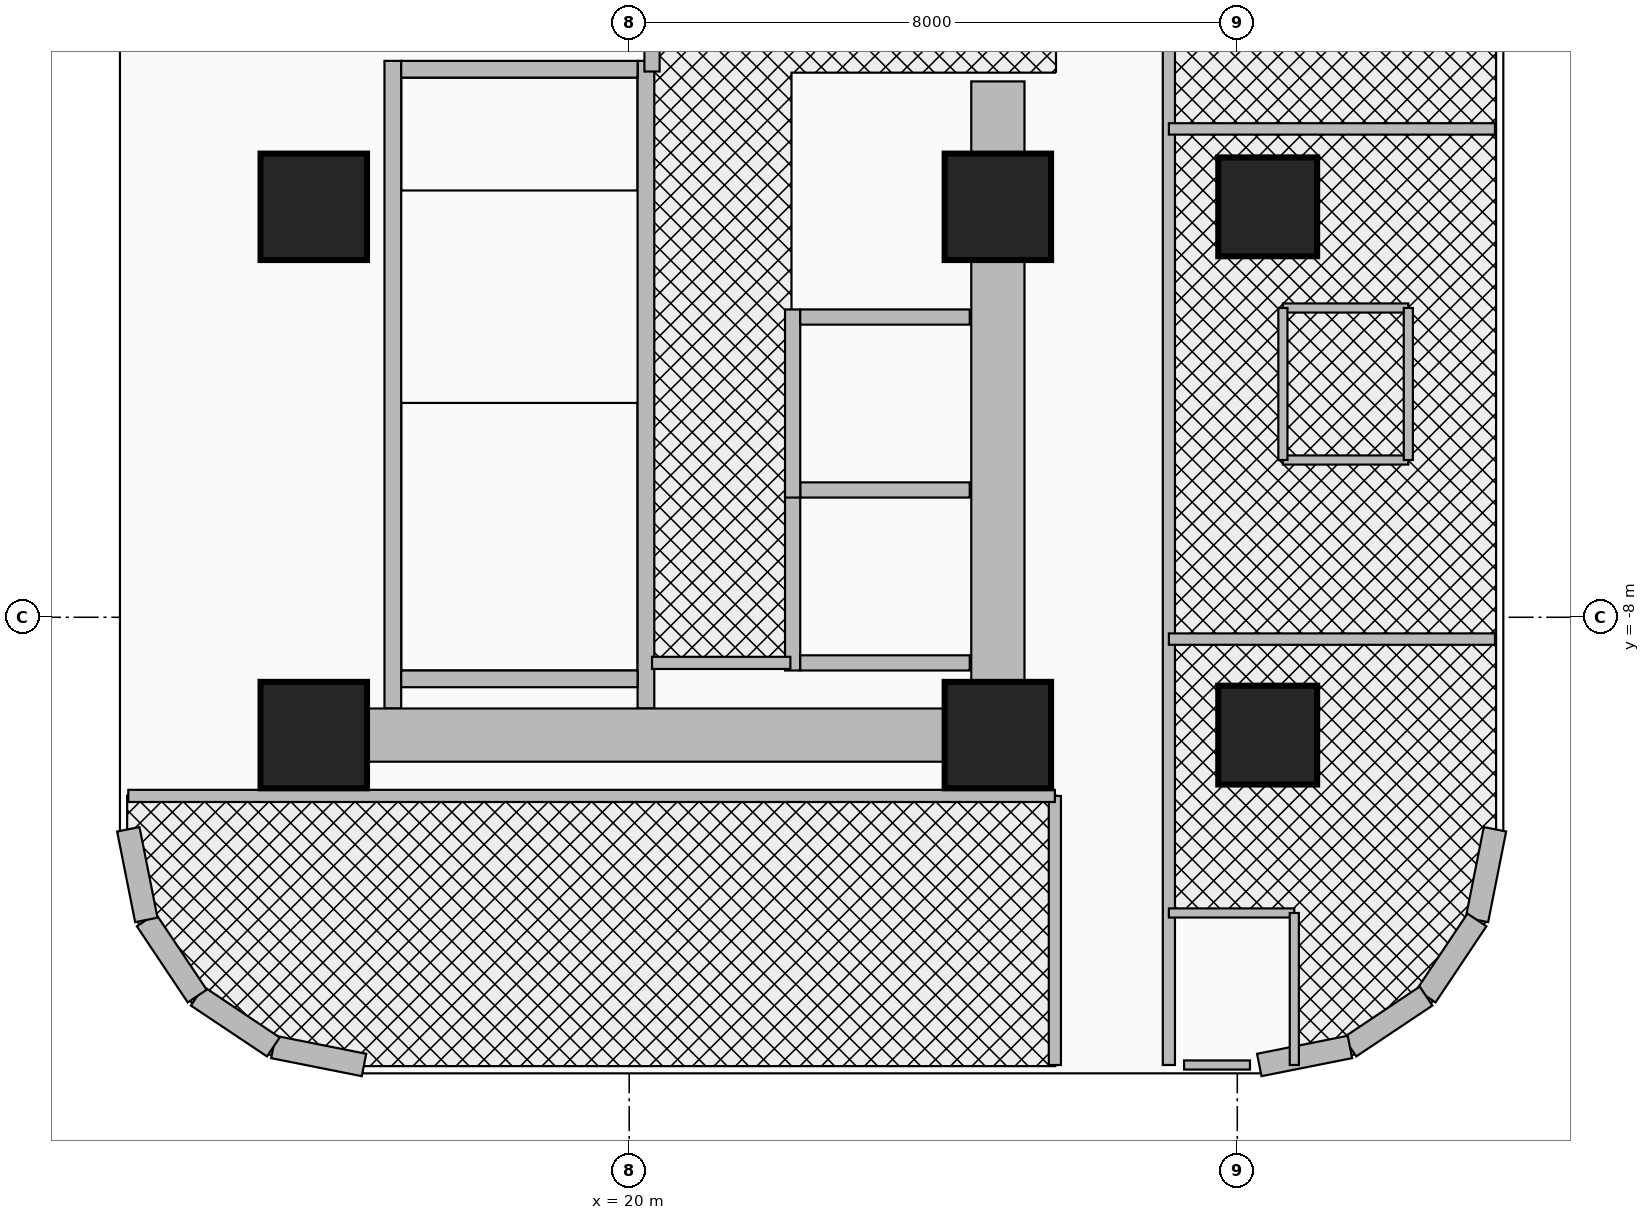
"""IFC4 building model, lengths in metres.
Left out: names, types, materials, properties, quantities, classifications, styles, units other than length and angle.
Written with IfcOpenShell. Run it as: python <this file> out.ifc"""

import sys

from ifc_helpers import new_model, si_unit, direction, frame, frame_2d, origin, origin_2d, place, context, subcontext, project, spatial, rectangle, circle, extrude, source, transform, mapped, element, fill, save


model = new_model("IFC4")
c1 = context("Model", 3, precision=1e-05, world=origin(), true_north=direction((0.0, 1.0)))
c2 = subcontext(c1, "Body", "Model", "MODEL_VIEW")
j1 = project(units=[si_unit("LENGTHUNIT", "METRE"), si_unit("PLANEANGLEUNIT", "RADIAN")], contexts=[c1])
p1 = place(None, origin())
s1 = spatial("IfcSite", under=j1, at=p1, CompositionType="ELEMENT")
p2 = place(p1, origin())
s2 = spatial("IfcBuilding", under=s1, at=p2, CompositionType="ELEMENT")
p3 = place(p2, frame((0.0, 0.0, 70.4)))
s3 = spatial("IfcBuildingStorey", under=s2, at=p3, CompositionType="ELEMENT", Elevation=70.4)
for number, where, z_axis, x_axis in (
    (1, (16.89, -9.2, 0.0), (0.0, 0.0, 1.0), (0.0, 1.0, 0.0)),
    (2, (20.22, -9.2, 0.0), (0.0, 0.0, 1.0), (0.0, 1.0, 0.0)),
):
    element("IfcWall", number, at=place(p3, frame(where, z_axis=z_axis, x_axis=x_axis)), inside=s3, PredefinedType="SHEAR", context=c2, shape_type="SweptSolid", body=[
        extrude(rectangle(XDim=8.52, YDim=0.22, at=frame_2d((4.26, 0.0))), origin(), (0.0, 0.0, 1.0), 3.46),
    ])
p4 = place(p3, frame((17.0, -8.81, 0.0), z_axis=(0.0, 0.0, 1.0), x_axis=(1.0, 0.0, 0.0)))
e3 = element("IfcWall", 3, at=p4, inside=s3, PredefinedType="SHEAR", context=c2, shape_type="SweptSolid", body=[
    extrude(rectangle(XDim=3.11, YDim=0.22, at=frame_2d((1.555, 0.0))), origin(), (0.0, 0.0, 1.0), 3.46),
])
p5 = place(p3, frame((17.0, -0.79, 0.0), z_axis=(0.0, 0.0, 1.0), x_axis=(1.0, 0.0, 0.0)))
e4 = element("IfcWall", 4, at=p5, inside=s3, PredefinedType="SHEAR", context=c2, shape_type="SweptSolid", body=[
    extrude(rectangle(XDim=3.11, YDim=0.22, at=frame_2d((1.555, 0.0))), origin(), (0.0, 0.0, 1.0), 3.46),
])
p6 = place(p5, frame((0.95, 0.0, 0.0)))
e5 = element("IfcOpeningElement", 5, at=p6, cuts=e4, PredefinedType="OPENING", context=c2, shape_type="SweptSolid", body=[
    extrude(rectangle(XDim=1.1, YDim=2.15, at=frame_2d((0.55, 1.075))), frame((0.0, 0.125, 0.0), z_axis=(0.0, -1.0, 0.0), x_axis=(1.0, 0.0, 0.0)), (0.0, 0.0, 1.0), 0.25),
])
p7 = place(p3, frame((24.85, -9.9, 0.0), z_axis=(0.0, 0.0, 1.0), x_axis=(0.0, 1.0, 0.0)))
e6 = element("IfcWall", 6, at=p7, inside=s3, PredefinedType="SHEAR", context=c2, shape_type="SweptSolid", body=[
    extrude(rectangle(XDim=8.95, YDim=0.7, at=frame_2d((4.475, 0.0))), origin(), (0.0, 0.0, 1.0), 3.46),
])
p8 = place(p3, frame((15.85, -9.55, 0.0), z_axis=(0.0, 0.0, 1.0), x_axis=(1.0, 0.0, 0.0)))
e7 = element("IfcWall", 7, at=p8, inside=s3, PredefinedType="SHEAR", context=c2, shape_type="SweptSolid", body=[
    extrude(rectangle(XDim=9.0, YDim=0.7, at=frame_2d((4.5, 0.0))), origin(), (0.0, 0.0, 1.0), 3.46),
])
m1 = source(origin(), c2, "Body", "SweptSolid", [
    extrude(rectangle(XDim=1.4, YDim=1.4, at=origin_2d()), origin(), (0.0, 0.0, 1.0), 3.7),
])
for number, where, z_axis, x_axis in (
    (8, (15.85, -9.55, 0.0), (0.0, 0.0, 1.0), (1.0, 0.0, 0.0)),
    (9, (24.85, -9.55, 0.0), (0.0, 0.0, 1.0), (1.0, 0.0, 0.0)),
):
    element("IfcColumn", number, at=place(p3, frame(where, z_axis=z_axis, x_axis=x_axis)), inside=s3, PredefinedType="COLUMN", context=c2, shape_type="MappedRepresentation", body=[
        mapped(m1, transform((0.0, 0.0, 0.0), x_axis=(1.0, 0.0, 0.0), y_axis=(0.0, 1.0, 0.0), z_axis=(0.0, 0.0, 1.0), scale=1.0)),
    ])
m2 = source(origin(), c2, "Body", "SweptSolid", [
    extrude(circle(Radius=0.65, at=origin_2d()), origin(), (0.0, 0.0, 1.0), 3.7),
])
p9 = place(p3, frame((28.4, -9.55, 0.0), z_axis=(0.0, 0.0, 1.0), x_axis=(1.0, 0.0, 0.0)))
e10 = element("IfcColumn", 10, at=p9, inside=s3, PredefinedType="COLUMN", context=c2, shape_type="MappedRepresentation", body=[
    mapped(m2, transform((0.0, 0.0, 0.0), x_axis=(1.0, 0.0, 0.0), y_axis=(0.0, 1.0, 0.0), z_axis=(0.0, 0.0, 1.0), scale=1.0)),
])
for number, where, z_axis, x_axis in (
    (11, (15.85, -2.6, 0.0), (0.0, 0.0, 1.0), (1.0, 0.0, 0.0)),
    (12, (24.85, -2.6, 0.0), (0.0, 0.0, 1.0), (1.0, 0.0, 0.0)),
):
    element("IfcColumn", number, at=place(p3, frame(where, z_axis=z_axis, x_axis=x_axis)), inside=s3, PredefinedType="COLUMN", context=c2, shape_type="MappedRepresentation", body=[
        mapped(m1, transform((0.0, 0.0, 0.0), x_axis=(1.0, 0.0, 0.0), y_axis=(0.0, 1.0, 0.0), z_axis=(0.0, 0.0, 1.0), scale=1.0)),
    ])
p10 = place(p3, frame((28.4, -2.6, 0.0), z_axis=(0.0, 0.0, 1.0), x_axis=(1.0, 0.0, 0.0)))
e13 = element("IfcColumn", 13, at=p10, inside=s3, PredefinedType="COLUMN", context=c2, shape_type="MappedRepresentation", body=[
    mapped(m2, transform((0.0, 0.0, 0.0), x_axis=(1.0, 0.0, 0.0), y_axis=(0.0, 1.0, 0.0), z_axis=(0.0, 0.0, 1.0), scale=1.0)),
])
p11 = place(p3, frame((31.39, -10.789, 0.0), z_axis=(0.0, 0.0, 1.0), x_axis=(-0.194996050505, -0.980804027463, 0.0)))
e14 = element("IfcWall", 14, at=p11, inside=s3, PredefinedType="SOLIDWALL", context=c2, shape_type="SweptSolid", body=[
    extrude(rectangle(XDim=1.216, YDim=0.3, at=frame_2d((0.608, 0.0))), origin(), (0.0, 0.0, 1.0), 3.46),
])
for number, where, z_axis, x_axis in (
    (15, (31.153, -11.982, 0.0), (0.0, 0.0, 1.0), (-0.556, -0.831, 0.0)),
    (16, (30.483, -12.983, 0.0), (0.0, 0.0, 1.0), (-0.831, -0.556, 0.0)),
):
    element("IfcWall", number, at=place(p3, frame(where, z_axis=z_axis, x_axis=x_axis)), inside=s3, PredefinedType="SOLIDWALL", context=c2, shape_type="SweptSolid", body=[
        extrude(rectangle(XDim=1.205, YDim=0.3, at=frame_2d((0.603, 0.0))), origin(), (0.0, 0.0, 1.0), 3.46),
    ])
for number, where, z_axis, x_axis in (
    (17, (29.482, -13.653, 0.0), (0.0, 0.0, 1.0), (-0.981, -0.195, 0.0)),
    (18, (16.511, -13.89, 0.0), (0.0, 0.0, 1.0), (-0.981, 0.195, 0.0)),
):
    element("IfcWall", number, at=place(p3, frame(where, z_axis=z_axis, x_axis=x_axis)), inside=s3, PredefinedType="SOLIDWALL", context=c2, shape_type="SweptSolid", body=[
        extrude(rectangle(XDim=1.216, YDim=0.3, at=frame_2d((0.608, 0.0))), origin(), (0.0, 0.0, 1.0), 3.46),
    ])
for number, where, z_axis, x_axis in (
    (19, (15.318, -13.653, 0.0), (0.0, 0.0, 1.0), (-0.831, 0.556, 0.0)),
    (20, (14.317, -12.983, 0.0), (0.0, 0.0, 1.0), (-0.556, 0.831, 0.0)),
):
    element("IfcWall", number, at=place(p3, frame(where, z_axis=z_axis, x_axis=x_axis)), inside=s3, PredefinedType="SOLIDWALL", context=c2, shape_type="SweptSolid", body=[
        extrude(rectangle(XDim=1.205, YDim=0.3, at=frame_2d((0.603, 0.0))), origin(), (0.0, 0.0, 1.0), 3.46),
    ])
p12 = place(p3, frame((13.647, -11.982, 0.0), z_axis=(0.0, 0.0, 1.0), x_axis=(-0.195189223115, 0.980765602568, 0.0)))
e21 = element("IfcWall", 21, at=p12, inside=s3, PredefinedType="SOLIDWALL", context=c2, shape_type="SweptSolid", body=[
    extrude(rectangle(XDim=1.216, YDim=0.3, at=frame_2d((0.608, 0.0))), origin(), (0.0, 0.0, 1.0), 3.46),
])
p13 = place(p3, frame((22.15, -8.7, 0.0), z_axis=(0.0, 0.0, 1.0), x_axis=(0.0, 1.0, 0.0)))
e22 = element("IfcWall", 22, at=p13, inside=s3, PredefinedType="MOVABLE", context=c2, shape_type="SweptSolid", body=[
    extrude(rectangle(XDim=2.475, YDim=0.2, at=frame_2d((1.237, 0.0))), origin(), (0.0, 0.0, 1.0), 3.46),
])
p14 = place(p13, frame((0.688, 0.0, 0.0)))
e23 = element("IfcOpeningElement", 23, at=p14, cuts=e22, PredefinedType="OPENING", context=c2, shape_type="SweptSolid", body=[
    extrude(rectangle(XDim=1.1, YDim=2.1, at=frame_2d((0.55, 1.05))), frame((0.0, 0.115, 0.0), z_axis=(0.0, -1.0, 0.0), x_axis=(1.0, 0.0, 0.0)), (0.0, 0.0, 1.0), 0.23),
])
for number, where, z_axis, x_axis in (
    (24, (22.25, -8.6, 0.0), (0.0, 0.0, 1.0), (1.0, 0.0, 0.0)),
    (25, (22.25, -6.325, 0.0), (0.0, 0.0, 1.0), (1.0, 0.0, 0.0)),
):
    element("IfcWall", number, at=place(p3, frame(where, z_axis=z_axis, x_axis=x_axis)), inside=s3, PredefinedType="MOVABLE", context=c2, shape_type="SweptSolid", body=[
        extrude(rectangle(XDim=2.23, YDim=0.2, at=frame_2d((1.115, 0.0))), origin(), (0.0, 0.0, 1.0), 3.46),
    ])
p15 = place(p3, frame((22.15, -6.425, 0.0), z_axis=(0.0, 0.0, 1.0), x_axis=(0.0, 1.0, 0.0)))
e26 = element("IfcWall", 26, at=p15, inside=s3, PredefinedType="MOVABLE", context=c2, shape_type="SweptSolid", body=[
    extrude(rectangle(XDim=2.475, YDim=0.2, at=frame_2d((1.238, 0.0))), origin(), (0.0, 0.0, 1.0), 3.46),
])
p16 = place(p15, frame((0.688, 0.0, 0.0)))
e27 = element("IfcOpeningElement", 27, at=p16, cuts=e26, PredefinedType="OPENING", context=c2, shape_type="SweptSolid", body=[
    extrude(rectangle(XDim=1.1, YDim=2.1, at=frame_2d((0.55, 1.05))), frame((0.0, 0.115, 0.0), z_axis=(0.0, -1.0, 0.0), x_axis=(1.0, 0.0, 0.0)), (0.0, 0.0, 1.0), 0.23),
])
p17 = place(p3, frame((22.25, -4.05, 0.0), z_axis=(0.0, 0.0, 1.0), x_axis=(1.0, 0.0, 0.0)))
e28 = element("IfcWall", 28, at=p17, inside=s3, PredefinedType="MOVABLE", context=c2, shape_type="SweptSolid", body=[
    extrude(rectangle(XDim=2.23, YDim=0.2, at=frame_2d((1.115, 0.0))), origin(), (0.0, 0.0, 1.0), 3.46),
])
p18 = place(p3, frame((20.3, -0.82, 0.0), z_axis=(0.0, 0.0, 1.0), x_axis=(0.0, 1.0, 0.0)))
e29 = element("IfcWall", 29, at=p18, inside=s3, PredefinedType="PARTITIONING", context=c2, shape_type="SweptSolid", body=[
    extrude(rectangle(XDim=1.64, YDim=0.2, at=frame_2d((0.82, 0.0))), origin(), (0.0, 0.0, 1.0), 3.46),
])
p19 = place(p18, frame((0.295, 0.0, 0.0)))
e30 = element("IfcOpeningElement", 30, at=p19, cuts=e29, PredefinedType="OPENING", context=c2, shape_type="SweptSolid", body=[
    extrude(rectangle(XDim=1.05, YDim=2.15, at=frame_2d((0.525, 1.075))), frame((0.0, 0.115, 0.0), z_axis=(0.0, -1.0, 0.0), x_axis=(1.0, 0.0, 0.0)), (0.0, 0.0, 1.0), 0.23),
])
p20 = place(p3, frame((20.3, -8.6, 0.0), z_axis=(0.0, 0.0, 1.0), x_axis=(1.0, 0.0, 0.0)))
e31 = element("IfcWall", 31, at=p20, inside=s3, PredefinedType="PARTITIONING", context=c2, shape_type="SweptSolid", body=[
    extrude(rectangle(XDim=1.82, YDim=0.16, at=frame_2d((0.91, 0.0))), origin(), (0.0, 0.0, 1.0), 3.46),
])
p21 = place(p3, frame((25.6, -13.89, 0.0), z_axis=(0.0, 0.0, 1.0), x_axis=(0.0, 1.0, 0.0)))
e32 = element("IfcWall", 32, at=p21, inside=s3, PredefinedType="PARTITIONING", context=c2, shape_type="SweptSolid", body=[
    extrude(rectangle(XDim=3.54, YDim=0.16, at=frame_2d((1.77, 0.0))), origin(), (0.0, 0.0, 1.0), 3.46),
])
p22 = place(p21, frame((1.32, 0.0, 0.0)))
e33 = element("IfcOpeningElement", 33, at=p22, cuts=e32, PredefinedType="OPENING", context=c2, shape_type="SweptSolid", body=[
    extrude(rectangle(XDim=0.9, YDim=2.1, at=frame_2d((0.45, 1.05))), frame((0.0, 0.095, 0.0), z_axis=(0.0, -1.0, 0.0), x_axis=(1.0, 0.0, 0.0)), (0.0, 0.0, 1.0), 0.19),
])
p23 = place(p3, frame((13.41, -10.35, 0.0), z_axis=(0.0, 0.0, 1.0), x_axis=(1.0, 0.0, 0.0)))
e34 = element("IfcWall", 34, at=p23, inside=s3, PredefinedType="PARTITIONING", context=c2, shape_type="SweptSolid", body=[
    extrude(rectangle(XDim=12.19, YDim=0.16, at=frame_2d((6.095, 0.0))), origin(), (0.0, 0.0, 1.0), 3.46),
])
p24 = place(p3, frame((27.1, -13.89, 0.0), z_axis=(0.0, 0.0, 1.0), x_axis=(0.0, 1.0, 0.0)))
e35 = element("IfcWall", 35, at=p24, inside=s3, PredefinedType="PARTITIONING", context=c2, shape_type="SweptSolid", body=[
    extrude(rectangle(XDim=25.74, YDim=0.16, at=frame_2d((12.87, 0.0))), origin(), (0.0, 0.0, 1.0), 2.583),
])
p25 = place(p24, frame((2.62, 0.0, 0.0)))
e36 = element("IfcOpeningElement", 36, at=p25, cuts=e35, PredefinedType="OPENING", context=c2, shape_type="SweptSolid", body=[
    extrude(rectangle(XDim=0.95, YDim=2.15, at=frame_2d((0.475, 1.075))), frame((0.0, 0.095, 0.0), z_axis=(0.0, -1.0, 0.0), x_axis=(1.0, 0.0, 0.0)), (0.0, 0.0, 1.0), 0.19),
])
p26 = place(p24, frame((8.484, 0.0, 0.0)))
e37 = element("IfcOpeningElement", 37, at=p26, cuts=e35, PredefinedType="OPENING", context=c2, shape_type="SweptSolid", body=[
    extrude(rectangle(XDim=0.95, YDim=2.15, at=frame_2d((0.475, 1.075))), frame((0.0, 0.095, 0.0), z_axis=(0.0, -1.0, 0.0), x_axis=(1.0, 0.0, 0.0)), (0.0, 0.0, 1.0), 0.19),
])
p27 = place(p24, frame((14.197, 0.0, 0.0)))
e38 = element("IfcOpeningElement", 38, at=p27, cuts=e35, PredefinedType="OPENING", context=c2, shape_type="SweptSolid", body=[
    extrude(rectangle(XDim=0.95, YDim=2.15, at=frame_2d((0.475, 1.075))), frame((0.0, 0.095, 0.0), z_axis=(0.0, -1.0, 0.0), x_axis=(1.0, 0.0, 0.0)), (0.0, 0.0, 1.0), 0.19),
])
p28 = place(p24, frame((21.648, 0.0, 0.0)))
e39 = element("IfcOpeningElement", 39, at=p28, cuts=e35, PredefinedType="OPENING", context=c2, shape_type="SweptSolid", body=[
    extrude(rectangle(XDim=0.95, YDim=2.15, at=frame_2d((0.475, 1.075))), frame((0.0, 0.095, 0.0), z_axis=(0.0, -1.0, 0.0), x_axis=(1.0, 0.0, 0.0)), (0.0, 0.0, 1.0), 0.19),
])
for number, where, z_axis, x_axis in (
    (40, (27.1, -8.287, 0.0), (0.0, 0.0, 1.0), (1.0, 0.0, 0.0)),
    (41, (27.1, -1.575, 0.0), (0.0, 0.0, 1.0), (1.0, 0.0, 0.0)),
):
    element("IfcWall", number, at=place(p3, frame(where, z_axis=z_axis, x_axis=x_axis)), inside=s3, PredefinedType="PARTITIONING", context=c2, shape_type="SweptSolid", body=[
        extrude(rectangle(XDim=4.29, YDim=0.15, at=frame_2d((2.145, 0.0))), origin(), (0.0, 0.0, 1.0), 2.896),
    ])
p29 = place(p3, frame((27.1, -11.89, 0.0), z_axis=(0.0, 0.0, 1.0), x_axis=(1.0, 0.0, 0.0)))
e42 = element("IfcWall", 42, at=p29, inside=s3, PredefinedType="PARTITIONING", context=c2, shape_type="SweptSolid", body=[
    extrude(rectangle(XDim=1.65, YDim=0.12, at=frame_2d((0.825, 0.0))), origin(), (0.0, 0.0, 1.0), 3.46),
])
p30 = place(p3, frame((28.75, -13.89, 0.0), z_axis=(0.0, 0.0, 1.0), x_axis=(0.0, 1.0, 0.0)))
e43 = element("IfcWall", 43, at=p30, inside=s3, PredefinedType="PARTITIONING", context=c2, shape_type="SweptSolid", body=[
    extrude(rectangle(XDim=2.0, YDim=0.12, at=frame_2d((1.0, 0.0))), origin(), (0.0, 0.0, 1.0), 3.46),
])
p31 = place(p30, frame((0.575, 0.0, 0.0)))
e44 = element("IfcOpeningElement", 44, at=p31, cuts=e43, PredefinedType="OPENING", context=c2, shape_type="SweptSolid", body=[
    extrude(rectangle(XDim=0.85, YDim=2.1, at=frame_2d((0.425, 1.05))), frame((0.0, 0.075, 0.0), z_axis=(0.0, -1.0, 0.0), x_axis=(1.0, 0.0, 0.0)), (0.0, 0.0, 1.0), 0.15),
])
p32 = place(p3, frame((27.3, -13.89, 0.0), z_axis=(0.0, 0.0, 1.0), x_axis=(1.0, 0.0, 0.0)))
e45 = element("IfcWall", 45, at=p32, inside=s3, PredefinedType="PARTITIONING", context=c2, shape_type="SweptSolid", body=[
    extrude(rectangle(XDim=0.867, YDim=0.12, at=frame_2d((0.433, 0.0))), origin(), (0.0, 0.0, 1.0), 3.46),
])
for number, where, z_axis, x_axis in (
    (46, (28.6, -5.931, 0.0), (0.0, 0.0, 1.0), (1.0, 0.0, 0.0)),
    (47, (28.6, -3.931, 0.0), (0.0, 0.0, 1.0), (1.0, 0.0, 0.0)),
):
    element("IfcWall", number, at=place(p3, frame(where, z_axis=z_axis, x_axis=x_axis)), inside=s3, PredefinedType="PARTITIONING", context=c2, shape_type="SweptSolid", body=[
        extrude(rectangle(XDim=1.65, YDim=0.12, at=frame_2d((0.825, 0.0))), origin(), (0.0, 0.0, 1.0), 3.46),
    ])
p33 = place(p3, frame((30.25, -5.931, 0.0), z_axis=(0.0, 0.0, 1.0), x_axis=(0.0, 1.0, 0.0)))
e48 = element("IfcWall", 48, at=p33, inside=s3, PredefinedType="PARTITIONING", context=c2, shape_type="SweptSolid", body=[
    extrude(rectangle(XDim=2.0, YDim=0.12, at=frame_2d((1.0, 0.0))), origin(), (0.0, 0.0, 1.0), 3.46),
])
p34 = place(p3, frame((28.6, -5.931, 0.0), z_axis=(0.0, 0.0, 1.0), x_axis=(0.0, 1.0, 0.0)))
e49 = element("IfcWall", 49, at=p34, inside=s3, PredefinedType="PARTITIONING", context=c2, shape_type="SweptSolid", body=[
    extrude(rectangle(XDim=2.0, YDim=0.12, at=frame_2d((1.0, 0.0))), origin(), (0.0, 0.0, 1.0), 3.46),
])
p35 = place(p34, frame((0.575, 0.0, 0.0)))
e50 = element("IfcOpeningElement", 50, at=p35, cuts=e49, PredefinedType="OPENING", context=c2, shape_type="SweptSolid", body=[
    extrude(rectangle(XDim=0.85, YDim=2.1, at=frame_2d((0.425, 1.05))), frame((0.0, 0.075, 0.0), z_axis=(0.0, -1.0, 0.0), x_axis=(1.0, 0.0, 0.0)), (0.0, 0.0, 1.0), 0.15),
])
p36 = place(p14, origin())
e51 = element("IfcDoor", 51, at=p36, inside=s3, OperationType="DOUBLE_DOOR_SLIDING", PredefinedType="DOOR", context=c2, shape_type="SweptSolid", body=[
    extrude(rectangle(XDim=1.1, YDim=2.1, at=frame_2d((0.55, 1.05))), frame((0.0, 0.025, 0.0), z_axis=(0.0, -1.0, 0.0), x_axis=(1.0, 0.0, 0.0)), (0.0, 0.0, 1.0), 0.05),
])
fill(e23, e51)
p37 = place(p16, origin())
e52 = element("IfcDoor", 52, at=p37, inside=s3, OperationType="DOUBLE_DOOR_SLIDING", PredefinedType="DOOR", context=c2, shape_type="SweptSolid", body=[
    extrude(rectangle(XDim=1.1, YDim=2.1, at=frame_2d((0.55, 1.05))), frame((0.0, 0.025, 0.0), z_axis=(0.0, -1.0, 0.0), x_axis=(1.0, 0.0, 0.0)), (0.0, 0.0, 1.0), 0.05),
])
fill(e27, e52)
p38 = place(p6, origin())
e53 = element("IfcDoor", 53, at=p38, inside=s3, OperationType="SINGLE_SWING_RIGHT", PredefinedType="DOOR", context=c2, shape_type="SweptSolid", body=[
    extrude(rectangle(XDim=1.1, YDim=2.15, at=frame_2d((0.55, 1.075))), frame((0.0, 0.025, 0.0), z_axis=(0.0, -1.0, 0.0), x_axis=(1.0, 0.0, 0.0)), (0.0, 0.0, 1.0), 0.05),
])
fill(e5, e53)
p39 = place(p22, origin())
e54 = element("IfcDoor", 54, at=p39, inside=s3, OperationType="SINGLE_SWING_RIGHT", PredefinedType="DOOR", context=c2, shape_type="SweptSolid", body=[
    extrude(rectangle(XDim=0.9, YDim=2.1, at=frame_2d((0.45, 1.05))), frame((0.0, 0.025, 0.0), z_axis=(0.0, -1.0, 0.0), x_axis=(1.0, 0.0, 0.0)), (0.0, 0.0, 1.0), 0.05),
])
fill(e33, e54)
p40 = place(p25, origin())
e55 = element("IfcDoor", 55, at=p40, inside=s3, OperationType="SINGLE_SWING_RIGHT", PredefinedType="DOOR", context=c2, shape_type="SweptSolid", body=[
    extrude(rectangle(XDim=0.95, YDim=2.15, at=frame_2d((0.475, 1.075))), frame((0.0, 0.025, 0.0), z_axis=(0.0, -1.0, 0.0), x_axis=(1.0, 0.0, 0.0)), (0.0, 0.0, 1.0), 0.05),
])
fill(e36, e55)
p41 = place(p31, origin())
e56 = element("IfcDoor", 56, at=p41, inside=s3, OperationType="SINGLE_SWING_LEFT", PredefinedType="DOOR", context=c2, shape_type="SweptSolid", body=[
    extrude(rectangle(XDim=0.85, YDim=2.1, at=frame_2d((0.425, 1.05))), frame((0.0, 0.025, 0.0), z_axis=(0.0, -1.0, 0.0), x_axis=(1.0, 0.0, 0.0)), (0.0, 0.0, 1.0), 0.05),
])
fill(e44, e56)
p42 = place(p26, origin())
e57 = element("IfcDoor", 57, at=p42, inside=s3, OperationType="SINGLE_SWING_RIGHT", PredefinedType="DOOR", context=c2, shape_type="SweptSolid", body=[
    extrude(rectangle(XDim=0.95, YDim=2.15, at=frame_2d((0.475, 1.075))), frame((0.0, 0.025, 0.0), z_axis=(0.0, -1.0, 0.0), x_axis=(1.0, 0.0, 0.0)), (0.0, 0.0, 1.0), 0.05),
])
fill(e37, e57)
p43 = place(p35, origin())
e58 = element("IfcDoor", 58, at=p43, inside=s3, OperationType="SINGLE_SWING_LEFT", PredefinedType="DOOR", context=c2, shape_type="SweptSolid", body=[
    extrude(rectangle(XDim=0.85, YDim=2.1, at=frame_2d((0.425, 1.05))), frame((0.0, 0.025, 0.0), z_axis=(0.0, -1.0, 0.0), x_axis=(1.0, 0.0, 0.0)), (0.0, 0.0, 1.0), 0.05),
])
fill(e50, e58)
save(model, sys.argv[1])
